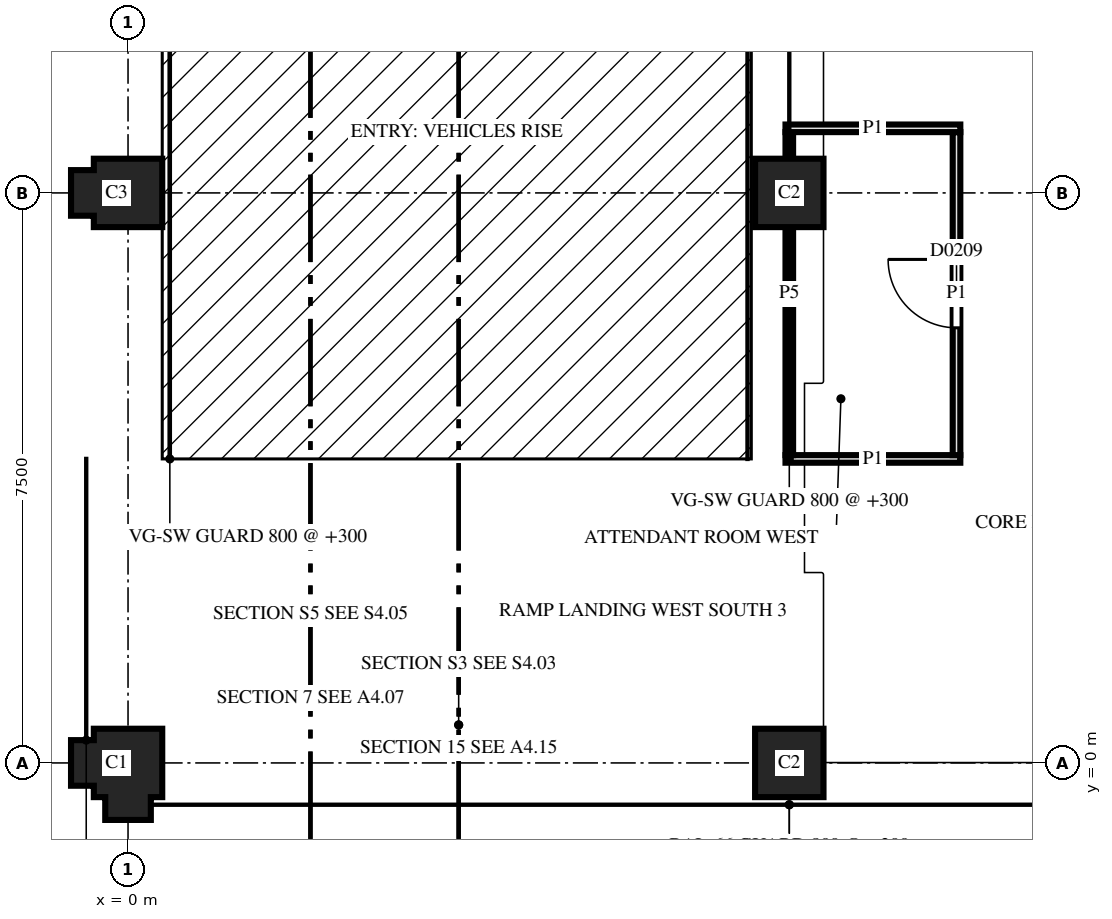
"""IFC4 building model, lengths in metres.
Left out: names, types, materials, properties, quantities, classifications, styles, units other than length and angle.
Written with IfcOpenShell. Run it as: python <this file> out.ifc"""

import sys

from ifc_helpers import new_model, si_unit, direction, frame, frame_2d, origin, place, context, subcontext, project, spatial, polyline, rectangle, outline, extrude, element, fill, save


model = new_model("IFC4")
c1 = context("Model", 3, precision=1e-05, world=origin(), true_north=direction((0.0, 1.0)))
c2 = subcontext(c1, "Body", "Model", "MODEL_VIEW")
j1 = project(units=[si_unit("LENGTHUNIT", "METRE"), si_unit("PLANEANGLEUNIT", "RADIAN")], contexts=[c1])
p1 = place(None, origin())
s1 = spatial("IfcSite", under=j1, at=p1, CompositionType="ELEMENT")
p2 = place(p1, origin())
s2 = spatial("IfcBuilding", under=s1, at=p2, CompositionType="ELEMENT")
p3 = place(p2, frame((0.0, 0.0, 8.2)))
s3 = spatial("IfcBuildingStorey", under=s2, at=p3, CompositionType="ELEMENT", Elevation=8.2)
p4 = place(p3, frame((0.0, 0.0, 0.0), z_axis=(0.0, 0.0, 1.0), x_axis=(-1.0, 0.0, 0.0)))
e1 = element("IfcColumn", 1, at=p4, inside=s3, PredefinedType="COLUMN", context=c2, shape_type="SweptSolid", body=[
    extrude(outline(polyline([(-0.45, -0.45), (0.45, -0.45), (0.45, -0.3), (0.75, -0.3), (0.75, 0.3), (0.45, 0.3), (0.45, 0.45), (0.3, 0.45), (0.3, 0.75), (-0.3, 0.75), (-0.3, 0.45), (-0.45, 0.45), (-0.45, -0.45)])), origin(), (0.0, 0.0, 1.0), 3.7),
])
p5 = place(p3, frame((8.7, 0.0, 0.0), z_axis=(0.0, 0.0, 1.0), x_axis=(1.0, 0.0, 0.0)))
e2 = element("IfcColumn", 2, at=p5, inside=s3, PredefinedType="COLUMN", context=c2, shape_type="SweptSolid", body=[
    extrude(outline(polyline([(-0.45, -0.45), (0.45, -0.45), (0.45, 0.45), (-0.45, 0.45), (-0.45, -0.45)])), origin(), (0.0, 0.0, 1.0), 3.7),
])
p6 = place(p3, frame((0.0, 7.5, 0.0), z_axis=(0.0, 0.0, 1.0), x_axis=(-1.0, 0.0, 0.0)))
e3 = element("IfcColumn", 3, at=p6, inside=s3, PredefinedType="COLUMN", context=c2, shape_type="SweptSolid", body=[
    extrude(outline(polyline([(-0.45, -0.45), (0.45, -0.45), (0.45, -0.3), (0.75, -0.3), (0.75, 0.3), (0.45, 0.3), (0.45, 0.45), (-0.45, 0.45), (-0.45, -0.45)])), origin(), (0.0, 0.0, 1.0), 3.7),
])
p7 = place(p3, frame((8.7, 7.5, 0.0), z_axis=(0.0, 0.0, 1.0), x_axis=(1.0, 0.0, 0.0)))
e4 = element("IfcColumn", 4, at=p7, inside=s3, PredefinedType="COLUMN", context=c2, shape_type="SweptSolid", body=[
    extrude(outline(polyline([(-0.45, -0.45), (0.45, -0.45), (0.45, 0.45), (-0.45, 0.45), (-0.45, -0.45)])), origin(), (0.0, 0.0, 1.0), 3.7),
])
p8 = place(p3, frame((8.65, 4.0, 0.0), z_axis=(0.0, 0.0, 1.0), x_axis=(1.0, 0.0, 0.0)))
e5 = element("IfcWall", 5, at=p8, inside=s3, PredefinedType="PARTITIONING", context=c2, shape_type="SweptSolid", body=[
    extrude(rectangle(XDim=2.3, YDim=0.1, at=frame_2d((1.15, 0.0))), origin(), (0.0, 0.0, 1.0), 2.88),
])
p9 = place(p3, frame((10.9, 4.05, 0.0), z_axis=(0.0, 0.0, 1.0), x_axis=(0.0, 1.0, 0.0)))
e6 = element("IfcWall", 6, at=p9, inside=s3, PredefinedType="PARTITIONING", context=c2, shape_type="SweptSolid", body=[
    extrude(rectangle(XDim=4.25, YDim=0.1, at=frame_2d((2.125, 0.0))), origin(), (0.0, 0.0, 1.0), 2.88),
])
p10 = place(p9, frame((1.675, 0.0, 0.0)))
e7 = element("IfcOpeningElement", 7, at=p10, cuts=e6, PredefinedType="OPENING", context=c2, shape_type="SweptSolid", body=[
    extrude(rectangle(XDim=0.9, YDim=2.1, at=frame_2d((0.45, 1.05))), frame((0.0, 0.06, 0.0), z_axis=(0.0, -1.0, 0.0), x_axis=(1.0, 0.0, 0.0)), (0.0, 0.0, 1.0), 0.12),
])
p11 = place(p3, frame((8.7, 8.3, 0.0), z_axis=(0.0, 0.0, 1.0), x_axis=(0.0, -1.0, 0.0)))
e8 = element("IfcWall", 8, at=p11, inside=s3, PredefinedType="PARTITIONING", context=c2, shape_type="SweptSolid", body=[
    extrude(rectangle(XDim=4.25, YDim=0.1, at=frame_2d((2.125, 0.0))), origin(), (0.0, 0.0, 1.0), 2.6),
])
p12 = place(p3, frame((10.95, 8.35, 0.0), z_axis=(0.0, 0.0, 1.0), x_axis=(-1.0, 0.0, 0.0)))
e9 = element("IfcWall", 9, at=p12, inside=s3, PredefinedType="PARTITIONING", context=c2, shape_type="SweptSolid", body=[
    extrude(rectangle(XDim=2.3, YDim=0.1, at=frame_2d((1.15, 0.0))), origin(), (0.0, 0.0, 1.0), 2.88),
])
p13 = place(p10, origin())
e10 = element("IfcDoor", 10, at=p13, inside=s3, OperationType="SINGLE_SWING_LEFT", PredefinedType="DOOR", context=c2, shape_type="SweptSolid", body=[
    extrude(rectangle(XDim=0.9, YDim=2.1, at=frame_2d((0.45, 1.05))), frame((0.0, 0.025, 0.0), z_axis=(0.0, -1.0, 0.0), x_axis=(1.0, 0.0, 0.0)), (0.0, 0.0, 1.0), 0.05),
])
fill(e7, e10)
save(model, sys.argv[1])
